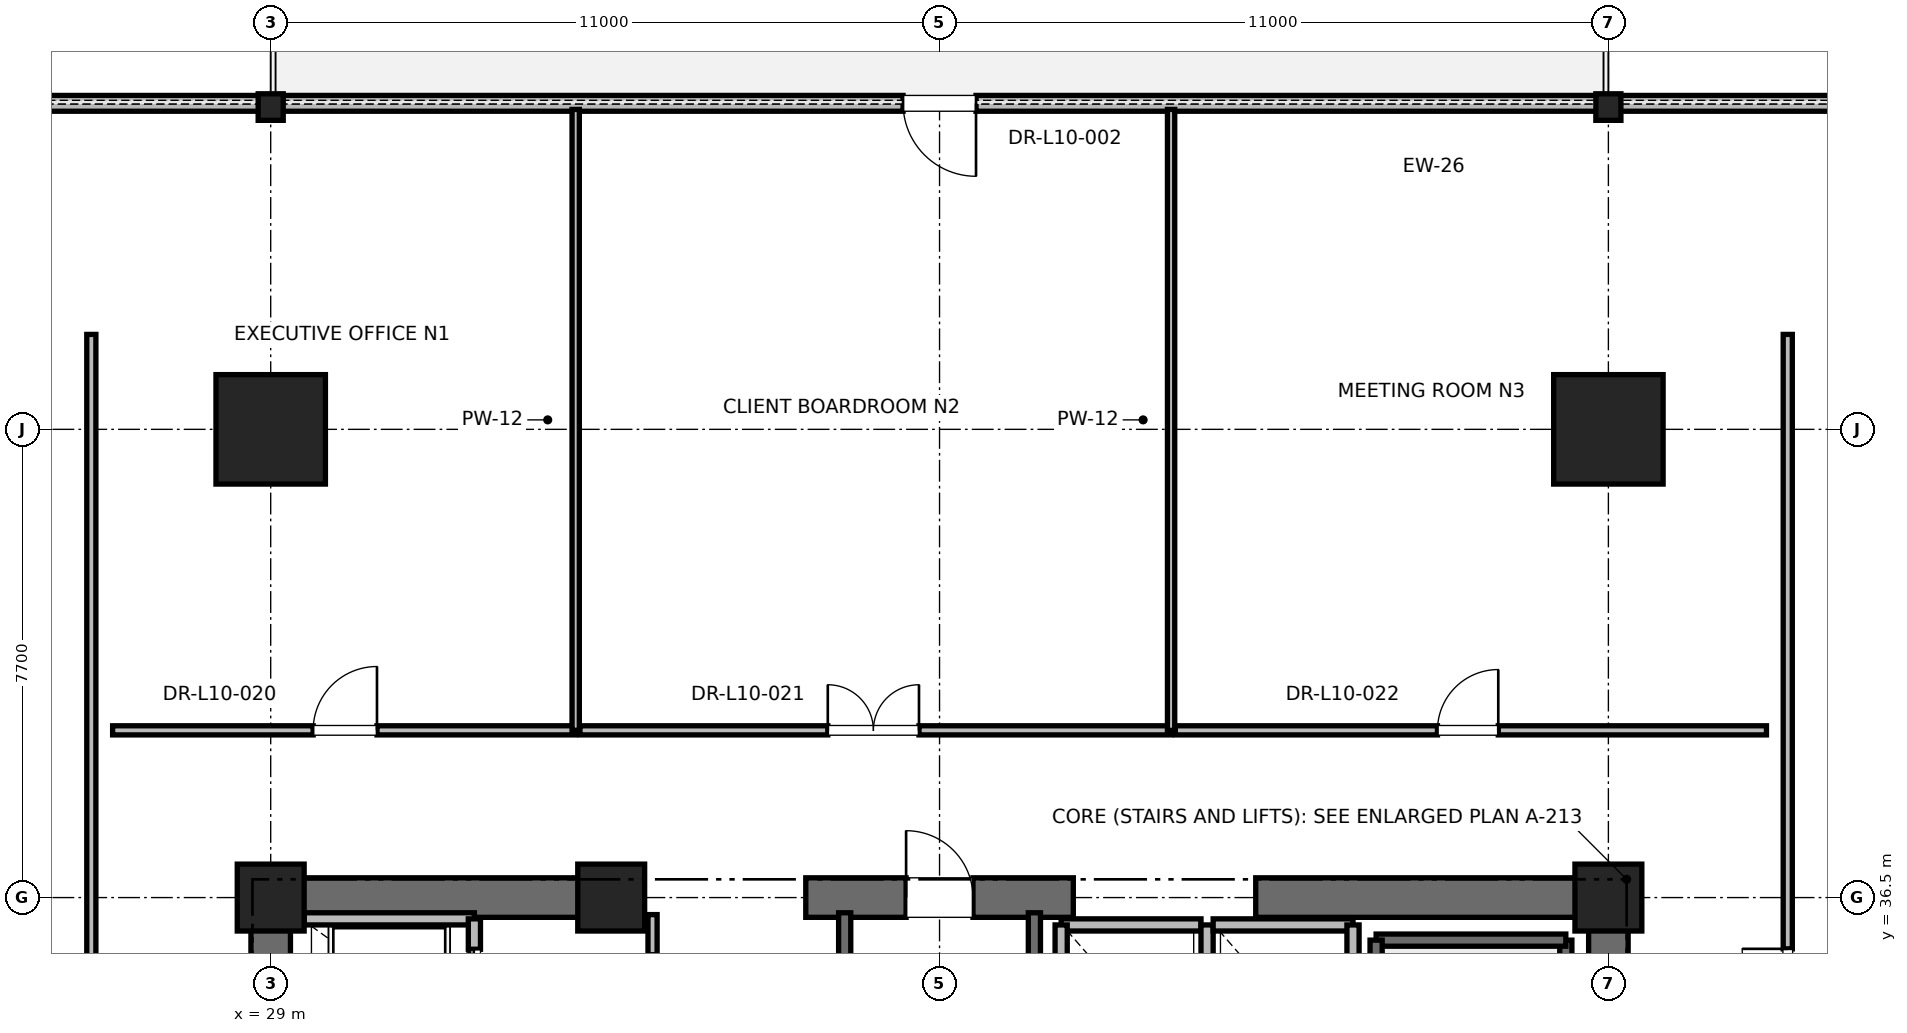
"""IFC4 building model, lengths in metres.
Left out: names, types, materials, properties, quantities, classifications, styles, units other than length and angle.
Written with IfcOpenShell. Run it as: python <this file> out.ifc"""

import sys

from ifc_helpers import new_model, si_unit, direction, frame, frame_2d, origin, origin_2d, place, context, subcontext, project, spatial, rectangle, i_section, extrude, element, fill, save


model = new_model("IFC4")
c1 = context("Model", 3, precision=1e-05, world=origin(), true_north=direction((0.0, 1.0)))
c2 = subcontext(c1, "Body", "Model", "MODEL_VIEW")
j1 = project(units=[si_unit("LENGTHUNIT", "METRE"), si_unit("PLANEANGLEUNIT", "RADIAN")], contexts=[c1])
p1 = place(None, origin())
s1 = spatial("IfcSite", under=j1, at=p1, CompositionType="ELEMENT")
p2 = place(p1, origin())
s2 = spatial("IfcBuilding", under=s1, at=p2, CompositionType="ELEMENT")
p3 = place(p2, frame((0.0, 0.0, 47.6)))
s3 = spatial("IfcBuildingStorey", under=s2, at=p3, CompositionType="ELEMENT", Elevation=47.6)
for number, where, z_axis, x_axis in (
    (1, (29.0, 44.2, 0.0), (0.0, 0.0, 1.0), (1.0, 0.0, 0.0)),
    (2, (51.0, 44.2, 0.0), (0.0, 0.0, 1.0), (1.0, 0.0, 0.0)),
):
    element("IfcColumn", number, at=place(p3, frame(where, z_axis=z_axis, x_axis=x_axis)), inside=s3, PredefinedType="COLUMN", context=c2, shape_type="SweptSolid", body=[
        extrude(rectangle(XDim=1.8, YDim=1.8, at=origin_2d()), origin(), (0.0, 0.0, 1.0), 4.0),
    ])
for number, where, z_axis, x_axis in (
    (3, (29.0, 49.5, 0.0), (0.0, 0.0, 1.0), (1.0, 0.0, 0.0)),
    (4, (51.0, 49.5, 0.0), (0.0, 0.0, 1.0), (1.0, 0.0, 0.0)),
):
    element("IfcColumn", number, at=place(p3, frame(where, z_axis=z_axis, x_axis=x_axis)), inside=s3, PredefinedType="COLUMN", context=c2, shape_type="SweptSolid", body=[
        extrude(i_section(OverallWidth=0.412, OverallDepth=0.437, WebThickness=0.036, FlangeThickness=0.058, FilletRadius=0.015, at=origin_2d()), origin(), (0.0, 0.0, 1.0), 4.0),
    ])
for number, where, z_axis, x_axis in (
    (5, (29.0, 36.5, 0.0), (0.0, 0.0, 1.0), (1.0, 0.0, 0.0)),
    (6, (51.0, 36.5, 0.0), (0.0, 0.0, 1.0), (1.0, 0.0, 0.0)),
    (7, (34.6, 36.5, 0.0), (0.0, 0.0, 1.0), (1.0, 0.0, 0.0)),
):
    element("IfcColumn", number, at=place(p3, frame(where, z_axis=z_axis, x_axis=x_axis)), inside=s3, PredefinedType="PILASTER", context=c2, shape_type="SweptSolid", body=[
        extrude(rectangle(XDim=1.1, YDim=1.1, at=origin_2d()), origin(), (0.0, 0.0, 1.0), 4.0),
    ])
p4 = place(p3, frame((29.0, 36.5, 0.0), z_axis=(0.0, 0.0, 1.0), x_axis=(1.0, 0.0, 0.0)))
e8 = element("IfcWall", 8, at=p4, inside=s3, PredefinedType="SHEAR", context=c2, shape_type="SweptSolid", body=[
    extrude(rectangle(XDim=5.8, YDim=0.65, at=frame_2d((2.9, 0.0))), origin(), (0.0, 0.0, 1.0), 3.76),
])
p5 = place(p3, frame((37.8, 36.5, 0.0), z_axis=(0.0, 0.0, 1.0), x_axis=(1.0, 0.0, 0.0)))
e9 = element("IfcWall", 9, at=p5, inside=s3, PredefinedType="SHEAR", context=c2, shape_type="SweptSolid", body=[
    extrude(rectangle(XDim=4.4, YDim=0.65, at=frame_2d((2.2, 0.0))), origin(), (0.0, 0.0, 1.0), 3.76),
])
p6 = place(p5, frame((1.65, 0.0, 0.0)))
e10 = element("IfcOpeningElement", 10, at=p6, cuts=e9, PredefinedType="OPENING", context=c2, shape_type="SweptSolid", body=[
    extrude(rectangle(XDim=1.1, YDim=2.15, at=frame_2d((0.55, 1.075))), frame((0.0, 0.325, 0.0), z_axis=(0.0, -1.0, 0.0), x_axis=(1.0, 0.0, 0.0)), (0.0, 0.0, 1.0), 0.65),
])
for number, where, z_axis, x_axis in (
    (11, (45.2, 36.5, 0.0), (0.0, 0.0, 1.0), (1.0, 0.0, 0.0)),
    (12, (29.0, 30.7, 0.0), (0.0, 0.0, 1.0), (0.0, 1.0, 0.0)),
):
    element("IfcWall", number, at=place(p3, frame(where, z_axis=z_axis, x_axis=x_axis)), inside=s3, PredefinedType="SHEAR", context=c2, shape_type="SweptSolid", body=[
        extrude(rectangle(XDim=5.8, YDim=0.65, at=frame_2d((2.9, 0.0))), origin(), (0.0, 0.0, 1.0), 3.76),
    ])
p7 = place(p3, frame((51.0, 27.7, 0.0), z_axis=(0.0, 0.0, 1.0), x_axis=(0.0, 1.0, 0.0)))
e13 = element("IfcWall", 13, at=p7, inside=s3, PredefinedType="SHEAR", context=c2, shape_type="SweptSolid", body=[
    extrude(rectangle(XDim=8.8, YDim=0.65, at=frame_2d((4.4, 0.0))), origin(), (0.0, 0.0, 1.0), 3.76),
])
p8 = place(p3, frame((61.659, 49.561, 0.0), z_axis=(0.0, 0.0, 1.0), x_axis=(-1.0, 0.0, 0.0)))
e14 = element("IfcWall", 14, at=p8, inside=s3, PredefinedType="PARAPET", context=c2, shape_type="SweptSolid", body=[
    extrude(rectangle(XDim=43.318, YDim=0.26, at=frame_2d((21.659, 0.0))), origin(), (0.0, 0.0, 1.0), 2.889),
])
p9 = place(p8, frame((4.2, 0.0, 0.85)))
e15 = element("IfcOpeningElement", 15, at=p9, cuts=e14, PredefinedType="OPENING", context=c2, shape_type="SweptSolid", body=[
    extrude(rectangle(XDim=1.8, YDim=2.2, at=frame_2d((0.9, 1.1))), frame((0.0, 0.13, 0.0), z_axis=(0.0, -1.0, 0.0), x_axis=(1.0, 0.0, 0.0)), (0.0, 0.0, 1.0), 0.26),
])
p10 = place(p8, frame((21.059, 0.0, 0.0)))
e16 = element("IfcOpeningElement", 16, at=p10, cuts=e14, PredefinedType="OPENING", context=c2, shape_type="SweptSolid", body=[
    extrude(rectangle(XDim=1.2, YDim=2.2, at=frame_2d((0.6, 1.1))), frame((0.0, 0.13, 0.0), z_axis=(0.0, -1.0, 0.0), x_axis=(1.0, 0.0, 0.0)), (0.0, 0.0, 1.0), 0.26),
])
p11 = place(p8, frame((37.318, 0.0, 0.85)))
e17 = element("IfcOpeningElement", 17, at=p11, cuts=e14, PredefinedType="OPENING", context=c2, shape_type="SweptSolid", body=[
    extrude(rectangle(XDim=1.8, YDim=2.2, at=frame_2d((0.9, 1.1))), frame((0.0, 0.13, 0.0), z_axis=(0.0, -1.0, 0.0), x_axis=(1.0, 0.0, 0.0)), (0.0, 0.0, 1.0), 0.26),
])
p12 = place(p3, frame((50.3, 27.65, 0.0), z_axis=(0.0, 0.0, 1.0), x_axis=(0.0, 1.0, 0.0)))
e18 = element("IfcWall", 18, at=p12, inside=s3, PredefinedType="SOLIDWALL", context=c2, shape_type="SweptSolid", body=[
    extrude(rectangle(XDim=8.15, YDim=0.2, at=frame_2d((4.075, 0.0))), origin(), (0.0, 0.0, 1.0), 3.76),
])
p13 = place(p3, frame((47.18, 35.8, 0.0), z_axis=(0.0, 0.0, 1.0), x_axis=(1.0, 0.0, 0.0)))
e19 = element("IfcWall", 19, at=p13, inside=s3, PredefinedType="SOLIDWALL", context=c2, shape_type="SweptSolid", body=[
    extrude(rectangle(XDim=3.12, YDim=0.2, at=frame_2d((1.56, 0.0))), origin(), (0.0, 0.0, 1.0), 3.76),
])
p14 = place(p3, frame((47.18, 27.62, 0.0), z_axis=(0.0, 0.0, 1.0), x_axis=(0.0, 1.0, 0.0)))
e20 = element("IfcWall", 20, at=p14, inside=s3, PredefinedType="SOLIDWALL", context=c2, shape_type="SweptSolid", body=[
    extrude(rectangle(XDim=8.18, YDim=0.2, at=frame_2d((4.09, 0.0))), origin(), (0.0, 0.0, 1.0), 3.76),
])
p15 = place(p3, frame((38.44, 27.38, 0.0), z_axis=(0.0, 0.0, 1.0), x_axis=(0.0, 1.0, 0.0)))
e21 = element("IfcWall", 21, at=p15, inside=s3, PredefinedType="SOLIDWALL", context=c2, shape_type="SweptSolid", body=[
    extrude(rectangle(XDim=8.87, YDim=0.2, at=frame_2d((4.435, 0.0))), origin(), (0.0, 0.0, 1.0), 3.76),
])
p16 = place(p3, frame((41.56, 27.68, 0.0), z_axis=(0.0, 0.0, 1.0), x_axis=(0.0, 1.0, 0.0)))
e22 = element("IfcWall", 22, at=p16, inside=s3, PredefinedType="SOLIDWALL", context=c2, shape_type="SweptSolid", body=[
    extrude(rectangle(XDim=8.57, YDim=0.2, at=frame_2d((4.285, 0.0))), origin(), (0.0, 0.0, 1.0), 3.76),
])
p17 = place(p3, frame((32.35, 36.15, 0.0), z_axis=(0.0, 0.0, 1.0), x_axis=(-1.0, 0.0, 0.0)))
e23 = element("IfcWall", 23, at=p17, inside=s3, PredefinedType="SOLIDWALL", context=c2, shape_type="SweptSolid", body=[
    extrude(rectangle(XDim=2.8, YDim=0.2, at=frame_2d((1.4, 0.0))), origin(), (0.0, 0.0, 1.0), 2.889),
])
p18 = place(p3, frame((32.35, 34.05, 0.0), z_axis=(0.0, 0.0, 1.0), x_axis=(0.0, 1.0, 0.0)))
e24 = element("IfcWall", 24, at=p18, inside=s3, PredefinedType="SOLIDWALL", context=c2, shape_type="SweptSolid", body=[
    extrude(rectangle(XDim=2.1, YDim=0.2, at=frame_2d((1.05, 0.0))), origin(), (0.0, 0.0, 1.0), 3.76),
])
p19 = place(p18, frame((0.5, 0.0, 0.0)))
e25 = element("IfcOpeningElement", 25, at=p19, cuts=e24, PredefinedType="OPENING", context=c2, shape_type="SweptSolid", body=[
    extrude(rectangle(XDim=1.1, YDim=2.2, at=frame_2d((0.55, 1.1))), frame((0.0, 0.1, 0.0), z_axis=(0.0, -1.0, 0.0), x_axis=(1.0, 0.0, 0.0)), (0.0, 0.0, 1.0), 0.2),
])
p20 = place(p3, frame((44.3, 36.05, 0.0), z_axis=(0.0, 0.0, 1.0), x_axis=(-1.0, 0.0, 0.0)))
e26 = element("IfcWall", 26, at=p20, inside=s3, PredefinedType="SOLIDWALL", context=c2, shape_type="SweptSolid", body=[
    extrude(rectangle(XDim=2.3, YDim=0.2, at=frame_2d((1.15, 0.0))), origin(), (0.0, 0.0, 1.0), 2.54),
])
for number, where, z_axis, x_axis in (
    (27, (42.0, 36.05, 0.0), (0.0, 0.0, 1.0), (0.0, -1.0, 0.0)),
    (28, (44.4, 33.45, 0.0), (0.0, 0.0, 1.0), (0.0, 1.0, 0.0)),
):
    element("IfcWall", number, at=place(p3, frame(where, z_axis=z_axis, x_axis=x_axis)), inside=s3, PredefinedType="SOLIDWALL", context=c2, shape_type="SweptSolid", body=[
        extrude(rectangle(XDim=2.6, YDim=0.2, at=frame_2d((1.3, 0.0))), origin(), (0.0, 0.0, 1.0), 2.54),
    ])
p21 = place(p3, frame((46.8, 36.05, 0.0), z_axis=(0.0, 0.0, 1.0), x_axis=(-1.0, 0.0, 0.0)))
e29 = element("IfcWall", 29, at=p21, inside=s3, PredefinedType="SOLIDWALL", context=c2, shape_type="SweptSolid", body=[
    extrude(rectangle(XDim=2.3, YDim=0.2, at=frame_2d((1.15, 0.0))), origin(), (0.0, 0.0, 1.0), 2.54),
])
p22 = place(p3, frame((46.8, 33.45, 0.0), z_axis=(0.0, 0.0, 1.0), x_axis=(0.0, 1.0, 0.0)))
e30 = element("IfcWall", 30, at=p22, inside=s3, PredefinedType="SOLIDWALL", context=c2, shape_type="SweptSolid", body=[
    extrude(rectangle(XDim=2.6, YDim=0.2, at=frame_2d((1.3, 0.0))), origin(), (0.0, 0.0, 1.0), 3.76),
])
p23 = place(p3, frame((35.28, 33.95, 0.0), z_axis=(0.0, 0.0, 1.0), x_axis=(0.0, 1.0, 0.0)))
e31 = element("IfcWall", 31, at=p23, inside=s3, PredefinedType="PARTITIONING", context=c2, shape_type="SweptSolid", body=[
    extrude(rectangle(XDim=2.27, YDim=0.15, at=frame_2d((1.135, 0.0))), origin(), (0.0, 0.0, 1.0), 2.54),
])
p24 = place(p23, frame((0.66, 0.0, 0.0)))
e32 = element("IfcOpeningElement", 32, at=p24, cuts=e31, PredefinedType="OPENING", context=c2, shape_type="SweptSolid", body=[
    extrude(rectangle(XDim=0.95, YDim=2.15, at=frame_2d((0.475, 1.075))), frame((0.0, 0.075, 0.0), z_axis=(0.0, -1.0, 0.0), x_axis=(1.0, 0.0, 0.0)), (0.0, 0.0, 1.0), 0.15),
])
p25 = place(p3, frame((26.4, 39.25, 0.0), z_axis=(0.0, 0.0, 1.0), x_axis=(1.0, 0.0, 0.0)))
e33 = element("IfcWall", 33, at=p25, inside=s3, PredefinedType="PARTITIONING", context=c2, shape_type="SweptSolid", body=[
    extrude(rectangle(XDim=7.616, YDim=0.15, at=frame_2d((3.808, 0.0))), origin(), (0.0, 0.0, 1.0), 2.85),
])
p26 = place(p25, frame((3.298, 0.0, 0.0)))
e34 = element("IfcOpeningElement", 34, at=p26, cuts=e33, PredefinedType="OPENING", context=c2, shape_type="SweptSolid", body=[
    extrude(rectangle(XDim=1.05, YDim=2.2, at=frame_2d((0.525, 1.1))), frame((0.0, 0.075, 0.0), z_axis=(0.0, -1.0, 0.0), x_axis=(1.0, 0.0, 0.0)), (0.0, 0.0, 1.0), 0.15),
])
p27 = place(p3, frame((34.016, 39.25, 0.0), z_axis=(0.0, 0.0, 1.0), x_axis=(0.0, 1.0, 0.0)))
e35 = element("IfcWall", 35, at=p27, inside=s3, PredefinedType="PARTITIONING", context=c2, shape_type="SweptSolid", body=[
    extrude(rectangle(XDim=10.211, YDim=0.12, at=frame_2d((5.105, 0.0))), origin(), (0.0, 0.0, 1.0), 2.39),
])
p28 = place(p3, frame((34.086, 39.25, 0.0), z_axis=(0.0, 0.0, 1.0), x_axis=(1.0, 0.0, 0.0)))
e36 = element("IfcWall", 36, at=p28, inside=s3, PredefinedType="PARTITIONING", context=c2, shape_type="SweptSolid", body=[
    extrude(rectangle(XDim=9.722, YDim=0.15, at=frame_2d((4.861, 0.0))), origin(), (0.0, 0.0, 1.0), 2.85),
])
p29 = place(p28, frame((4.076, 0.0, 0.0)))
e37 = element("IfcOpeningElement", 37, at=p29, cuts=e36, PredefinedType="OPENING", context=c2, shape_type="SweptSolid", body=[
    extrude(rectangle(XDim=1.5, YDim=2.25, at=frame_2d((0.75, 1.125))), frame((0.0, 0.075, 0.0), z_axis=(0.0, -1.0, 0.0), x_axis=(1.0, 0.0, 0.0)), (0.0, 0.0, 1.0), 0.15),
])
p30 = place(p3, frame((43.808, 39.25, 0.0), z_axis=(0.0, 0.0, 1.0), x_axis=(0.0, 1.0, 0.0)))
e38 = element("IfcWall", 38, at=p30, inside=s3, PredefinedType="PARTITIONING", context=c2, shape_type="SweptSolid", body=[
    extrude(rectangle(XDim=10.211, YDim=0.12, at=frame_2d((5.105, 0.0))), origin(), (0.0, 0.0, 1.0), 2.39),
])
p31 = place(p3, frame((43.878, 39.25, 0.0), z_axis=(0.0, 0.0, 1.0), x_axis=(1.0, 0.0, 0.0)))
e39 = element("IfcWall", 39, at=p31, inside=s3, PredefinedType="PARTITIONING", context=c2, shape_type="SweptSolid", body=[
    extrude(rectangle(XDim=9.722, YDim=0.15, at=frame_2d((4.861, 0.0))), origin(), (0.0, 0.0, 1.0), 2.85),
])
p32 = place(p31, frame((4.311, 0.0, 0.0)))
e40 = element("IfcOpeningElement", 40, at=p32, cuts=e39, PredefinedType="OPENING", context=c2, shape_type="SweptSolid", body=[
    extrude(rectangle(XDim=1.0, YDim=2.15, at=frame_2d((0.5, 1.075))), frame((0.0, 0.075, 0.0), z_axis=(0.0, -1.0, 0.0), x_axis=(1.0, 0.0, 0.0)), (0.0, 0.0, 1.0), 0.15),
])
p33 = place(p3, frame((26.05, 23.187, 0.0), z_axis=(0.0, 0.0, 1.0), x_axis=(0.0, 1.0, 0.0)))
e41 = element("IfcWall", 41, at=p33, inside=s3, PredefinedType="PARTITIONING", context=c2, shape_type="SweptSolid", body=[
    extrude(rectangle(XDim=22.574, YDim=0.15, at=frame_2d((11.287, 0.0))), origin(), (0.0, 0.0, 1.0), 2.85),
])
p34 = place(p33, frame((6.106, 0.0, 0.0)))
e42 = element("IfcOpeningElement", 42, at=p34, cuts=e41, PredefinedType="OPENING", context=c2, shape_type="SweptSolid", body=[
    extrude(rectangle(XDim=1.0, YDim=2.15, at=frame_2d((0.5, 1.075))), frame((0.0, 0.075, 0.0), z_axis=(0.0, -1.0, 0.0), x_axis=(1.0, 0.0, 0.0)), (0.0, 0.0, 1.0), 0.15),
])
p35 = place(p3, frame((53.95, 33.414, 0.0), z_axis=(0.0, 0.0, 1.0), x_axis=(0.0, 1.0, 0.0)))
e43 = element("IfcWall", 43, at=p35, inside=s3, PredefinedType="PARTITIONING", context=c2, shape_type="SweptSolid", body=[
    extrude(rectangle(XDim=12.348, YDim=0.15, at=frame_2d((6.174, 0.0))), origin(), (0.0, 0.0, 1.0), 2.85),
])
p36 = place(p35, frame((0.743, 0.0, 0.0)))
e44 = element("IfcOpeningElement", 44, at=p36, cuts=e43, PredefinedType="OPENING", context=c2, shape_type="SweptSolid", body=[
    extrude(rectangle(XDim=1.5, YDim=2.25, at=frame_2d((0.75, 1.125))), frame((0.0, 0.075, 0.0), z_axis=(0.0, -1.0, 0.0), x_axis=(1.0, 0.0, 0.0)), (0.0, 0.0, 1.0), 0.15),
])
p37 = place(p10, origin())
e45 = element("IfcDoor", 45, at=p37, inside=s3, OperationType="SINGLE_SWING_LEFT", PredefinedType="DOOR", context=c2, shape_type="SweptSolid", body=[
    extrude(rectangle(XDim=1.2, YDim=2.2, at=frame_2d((0.6, 1.1))), frame((0.0, 0.025, 0.0), z_axis=(0.0, -1.0, 0.0), x_axis=(1.0, 0.0, 0.0)), (0.0, 0.0, 1.0), 0.05),
])
fill(e16, e45)
p38 = place(p6, origin())
e46 = element("IfcDoor", 46, at=p38, inside=s3, OperationType="SINGLE_SWING_LEFT", PredefinedType="DOOR", context=c2, shape_type="SweptSolid", body=[
    extrude(rectangle(XDim=1.1, YDim=2.15, at=frame_2d((0.55, 1.075))), frame((0.0, 0.025, 0.0), z_axis=(0.0, -1.0, 0.0), x_axis=(1.0, 0.0, 0.0)), (0.0, 0.0, 1.0), 0.05),
])
fill(e10, e46)
p39 = place(p19, origin())
e47 = element("IfcDoor", 47, at=p39, inside=s3, OperationType="SLIDING_TO_RIGHT", PredefinedType="DOOR", context=c2, shape_type="SweptSolid", body=[
    extrude(rectangle(XDim=1.1, YDim=2.2, at=frame_2d((0.55, 1.1))), frame((0.0, 0.025, 0.0), z_axis=(0.0, -1.0, 0.0), x_axis=(1.0, 0.0, 0.0)), (0.0, 0.0, 1.0), 0.05),
])
fill(e25, e47)
p40 = place(p26, origin())
e48 = element("IfcDoor", 48, at=p40, inside=s3, OperationType="SINGLE_SWING_RIGHT", PredefinedType="DOOR", context=c2, shape_type="SweptSolid", body=[
    extrude(rectangle(XDim=1.05, YDim=2.2, at=frame_2d((0.525, 1.1))), frame((0.0, 0.025, 0.0), z_axis=(0.0, -1.0, 0.0), x_axis=(1.0, 0.0, 0.0)), (0.0, 0.0, 1.0), 0.05),
])
fill(e34, e48)
p41 = place(p29, origin())
e49 = element("IfcDoor", 49, at=p41, inside=s3, OperationType="DOUBLE_DOOR_SINGLE_SWING", PredefinedType="DOOR", context=c2, shape_type="SweptSolid", body=[
    extrude(rectangle(XDim=1.5, YDim=2.25, at=frame_2d((0.75, 1.125))), frame((0.0, 0.025, 0.0), z_axis=(0.0, -1.0, 0.0), x_axis=(1.0, 0.0, 0.0)), (0.0, 0.0, 1.0), 0.05),
])
fill(e37, e49)
p42 = place(p32, origin())
e50 = element("IfcDoor", 50, at=p42, inside=s3, OperationType="SINGLE_SWING_RIGHT", PredefinedType="DOOR", context=c2, shape_type="SweptSolid", body=[
    extrude(rectangle(XDim=1.0, YDim=2.15, at=frame_2d((0.5, 1.075))), frame((0.0, 0.025, 0.0), z_axis=(0.0, -1.0, 0.0), x_axis=(1.0, 0.0, 0.0)), (0.0, 0.0, 1.0), 0.05),
])
fill(e40, e50)
p43 = place(p36, origin())
e51 = element("IfcDoor", 51, at=p43, inside=s3, OperationType="DOUBLE_DOOR_SINGLE_SWING", PredefinedType="DOOR", context=c2, shape_type="SweptSolid", body=[
    extrude(rectangle(XDim=1.5, YDim=2.25, at=frame_2d((0.75, 1.125))), frame((0.0, 0.025, 0.0), z_axis=(0.0, -1.0, 0.0), x_axis=(1.0, 0.0, 0.0)), (0.0, 0.0, 1.0), 0.05),
])
fill(e44, e51)
save(model, sys.argv[1])
